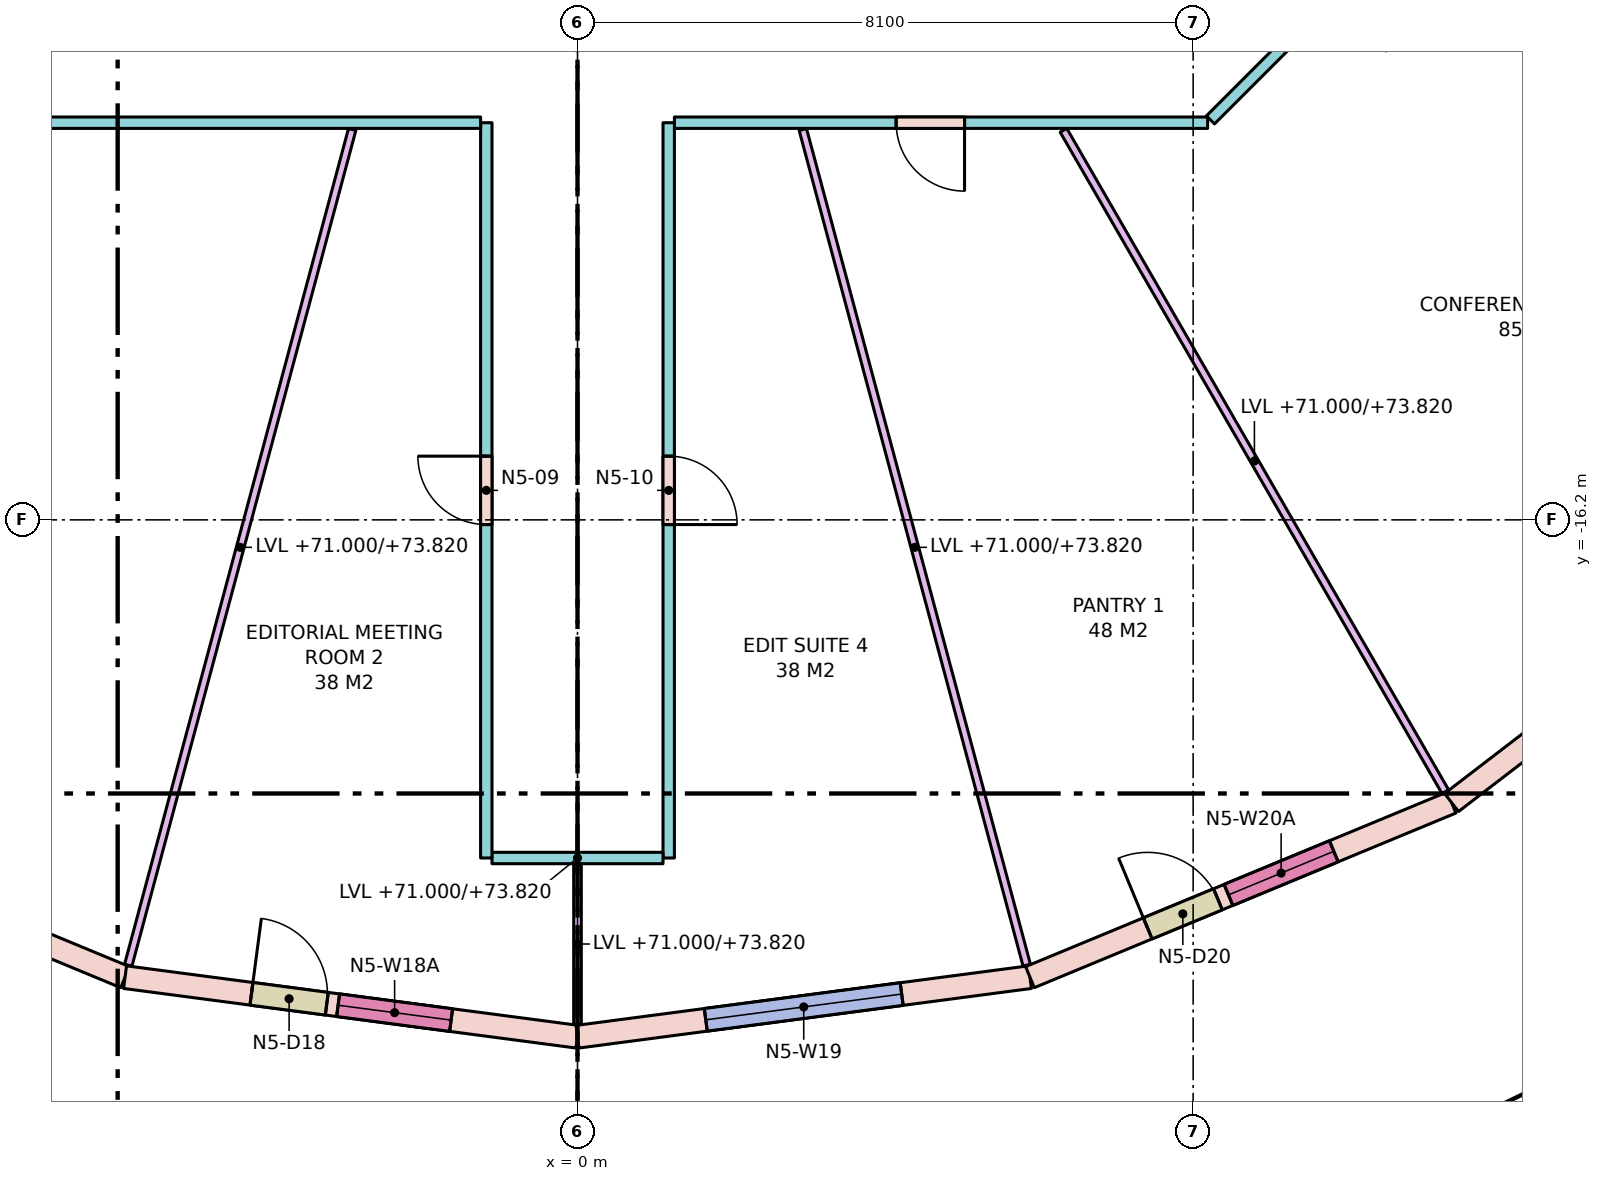
"""IFC4 building model, lengths in metres.
Left out: names, types, materials, properties, quantities, classifications, styles, units other than length and angle.
Written with IfcOpenShell. Run it as: python <this file> out.ifc"""

import sys

from ifc_helpers import new_model, si_unit, direction, frame, frame_2d, origin, place, context, subcontext, project, spatial, rectangle, extrude, element, fill, save


model = new_model("IFC4")
c1 = context("Model", 3, precision=1e-05, world=origin(), true_north=direction((0.0, 1.0)))
c2 = subcontext(c1, "Body", "Model", "MODEL_VIEW")
j1 = project(units=[si_unit("LENGTHUNIT", "METRE"), si_unit("PLANEANGLEUNIT", "RADIAN")], contexts=[c1])
p1 = place(None, origin())
s1 = spatial("IfcSite", under=j1, at=p1, CompositionType="ELEMENT")
p2 = place(p1, origin())
s2 = spatial("IfcBuilding", under=s1, at=p2, CompositionType="ELEMENT")
p3 = place(p2, frame((0.0, 0.0, 71.0)))
s3 = spatial("IfcBuildingStorey", under=s2, at=p3, CompositionType="ELEMENT", Elevation=71.0)
p4 = place(p3, frame((-11.5, -19.919, 0.0), z_axis=(0.0, 0.0, 1.0), x_axis=(0.923884511653, -0.382671411433, 0.0)))
e1 = element("IfcWall", 1, at=p4, inside=s3, PredefinedType="STANDARD", context=c2, shape_type="SweptSolid", body=[
    extrude(rectangle(XDim=6.004, YDim=0.3, at=frame_2d((3.002, 0.0))), origin(), (0.0, 0.0, 1.0), 3.72),
])
p5 = place(p4, frame((1.702, 0.0, 0.8)))
e2 = element("IfcOpeningElement", 2, at=p5, cuts=e1, PredefinedType="OPENING", context=c2, shape_type="SweptSolid", body=[
    extrude(rectangle(XDim=2.6, YDim=2.7, at=frame_2d((1.3, 1.35))), frame((0.0, 0.16, 0.0), z_axis=(0.0, -1.0, 0.0), x_axis=(1.0, 0.0, 0.0)), (0.0, 0.0, 1.0), 0.32),
])
p6 = place(p3, frame((-5.953, -22.216, 0.0), z_axis=(0.0, 0.0, 1.0), x_axis=(0.991445297315, -0.130522880875, 0.0)))
e3 = element("IfcWall", 3, at=p6, inside=s3, PredefinedType="STANDARD", context=c2, shape_type="SweptSolid", body=[
    extrude(rectangle(XDim=6.004, YDim=0.3, at=frame_2d((3.002, 0.0))), origin(), (0.0, 0.0, 1.0), 3.72),
])
p7 = place(p6, frame((1.677, 0.0, 0.0)))
e4 = element("IfcOpeningElement", 4, at=p7, cuts=e3, PredefinedType="OPENING", context=c2, shape_type="SweptSolid", body=[
    extrude(rectangle(XDim=1.0, YDim=2.4, at=frame_2d((0.5, 1.2))), frame((0.0, 0.16, 0.0), z_axis=(0.0, -1.0, 0.0), x_axis=(1.0, 0.0, 0.0)), (0.0, 0.0, 1.0), 0.32),
])
p8 = place(p6, frame((2.827, 0.0, 0.8)))
e5 = element("IfcOpeningElement", 5, at=p8, cuts=e3, PredefinedType="OPENING", context=c2, shape_type="SweptSolid", body=[
    extrude(rectangle(XDim=1.5, YDim=2.7, at=frame_2d((0.75, 1.35))), frame((0.0, 0.16, 0.0), z_axis=(0.0, -1.0, 0.0), x_axis=(1.0, 0.0, 0.0)), (0.0, 0.0, 1.0), 0.32),
])
p9 = place(p3, frame((0.0, -23.0, 0.0), z_axis=(0.0, 0.0, 1.0), x_axis=(0.991445297315, 0.130522880875, 0.0)))
e6 = element("IfcWall", 6, at=p9, inside=s3, PredefinedType="STANDARD", context=c2, shape_type="SweptSolid", body=[
    extrude(rectangle(XDim=6.004, YDim=0.3, at=frame_2d((3.002, 0.0))), origin(), (0.0, 0.0, 1.0), 3.72),
])
p10 = place(p9, frame((1.702, 0.0, 0.8)))
e7 = element("IfcOpeningElement", 7, at=p10, cuts=e6, PredefinedType="OPENING", context=c2, shape_type="SweptSolid", body=[
    extrude(rectangle(XDim=2.6, YDim=2.7, at=frame_2d((1.3, 1.35))), frame((0.0, 0.16, 0.0), z_axis=(0.0, -1.0, 0.0), x_axis=(1.0, 0.0, 0.0)), (0.0, 0.0, 1.0), 0.32),
])
p11 = place(p3, frame((5.953, -22.216, 0.0), z_axis=(0.0, 0.0, 1.0), x_axis=(0.923884511653, 0.382671411433, 0.0)))
e8 = element("IfcWall", 8, at=p11, inside=s3, PredefinedType="STANDARD", context=c2, shape_type="SweptSolid", body=[
    extrude(rectangle(XDim=6.004, YDim=0.3, at=frame_2d((3.002, 0.0))), origin(), (0.0, 0.0, 1.0), 3.72),
])
p12 = place(p11, frame((1.677, 0.0, 0.0)))
e9 = element("IfcOpeningElement", 9, at=p12, cuts=e8, PredefinedType="OPENING", context=c2, shape_type="SweptSolid", body=[
    extrude(rectangle(XDim=1.0, YDim=2.4, at=frame_2d((0.5, 1.2))), frame((0.0, 0.16, 0.0), z_axis=(0.0, -1.0, 0.0), x_axis=(1.0, 0.0, 0.0)), (0.0, 0.0, 1.0), 0.32),
])
p13 = place(p11, frame((2.827, 0.0, 0.8)))
e10 = element("IfcOpeningElement", 10, at=p13, cuts=e8, PredefinedType="OPENING", context=c2, shape_type="SweptSolid", body=[
    extrude(rectangle(XDim=1.5, YDim=2.7, at=frame_2d((0.75, 1.35))), frame((0.0, 0.16, 0.0), z_axis=(0.0, -1.0, 0.0), x_axis=(1.0, 0.0, 0.0)), (0.0, 0.0, 1.0), 0.32),
])
p14 = place(p3, frame((11.5, -19.919, 0.0), z_axis=(0.0, 0.0, 1.0), x_axis=(0.793339924758, 0.608778912074, 0.0)))
e11 = element("IfcWall", 11, at=p14, inside=s3, PredefinedType="STANDARD", context=c2, shape_type="SweptSolid", body=[
    extrude(rectangle(XDim=6.004, YDim=0.3, at=frame_2d((3.002, 0.0))), origin(), (0.0, 0.0, 1.0), 3.72),
])
p15 = place(p14, frame((1.702, 0.0, 0.8)))
e12 = element("IfcOpeningElement", 12, at=p15, cuts=e11, PredefinedType="OPENING", context=c2, shape_type="SweptSolid", body=[
    extrude(rectangle(XDim=2.6, YDim=2.7, at=frame_2d((1.3, 1.35))), frame((0.0, 0.16, 0.0), z_axis=(0.0, -1.0, 0.0), x_axis=(1.0, 0.0, 0.0)), (0.0, 0.0, 1.0), 0.32),
])
p16 = place(p3, frame((12.975, -6.291, 0.0), z_axis=(0.0, 0.0, 1.0), x_axis=(-0.707125355289, -0.707088206597, 0.0)))
e13 = element("IfcWall", 13, at=p16, inside=s3, PredefinedType="PARTITIONING", context=c2, shape_type="SweptSolid", body=[
    extrude(rectangle(XDim=6.572, YDim=0.15, at=frame_2d((3.286, 0.0))), origin(), (0.0, 0.0, 1.0), 2.82),
])
p17 = place(p16, frame((3.298, 0.0, 0.0)))
e14 = element("IfcOpeningElement", 14, at=p17, cuts=e13, PredefinedType="OPENING", context=c2, shape_type="SweptSolid", body=[
    extrude(rectangle(XDim=1.0, YDim=2.1, at=frame_2d((0.5, 1.05))), frame((0.0, 0.085, 0.0), z_axis=(0.0, -1.0, 0.0), x_axis=(1.0, 0.0, 0.0)), (0.0, 0.0, 1.0), 0.17),
])
p18 = place(p3, frame((8.291, -10.975, 0.0), z_axis=(0.0, 0.0, 1.0), x_axis=(-1.0, 0.0, 0.0)))
e15 = element("IfcWall", 15, at=p18, inside=s3, PredefinedType="PARTITIONING", context=c2, shape_type="SweptSolid", body=[
    extrude(rectangle(XDim=7.016, YDim=0.15, at=frame_2d((3.508, 0.0))), origin(), (0.0, 0.0, 1.0), 2.82),
])
p19 = place(p18, frame((3.198, 0.0, 0.0)))
e16 = element("IfcOpeningElement", 16, at=p19, cuts=e15, PredefinedType="OPENING", context=c2, shape_type="SweptSolid", body=[
    extrude(rectangle(XDim=0.9, YDim=2.1, at=frame_2d((0.45, 1.05))), frame((0.0, 0.085, 0.0), z_axis=(0.0, -1.0, 0.0), x_axis=(1.0, 0.0, 0.0)), (0.0, 0.0, 1.0), 0.17),
])
p20 = place(p3, frame((1.2, -10.975, 0.0), z_axis=(0.0, 0.0, 1.0), x_axis=(0.0, -1.0, 0.0)))
e17 = element("IfcWall", 17, at=p20, inside=s3, PredefinedType="PARTITIONING", context=c2, shape_type="SweptSolid", body=[
    extrude(rectangle(XDim=9.674, YDim=0.15, at=frame_2d((4.837, 0.0))), origin(), (0.0, 0.0, 1.0), 3.72),
])
p21 = place(p20, frame((4.387, 0.0, 0.0)))
e18 = element("IfcOpeningElement", 18, at=p21, cuts=e17, PredefinedType="OPENING", context=c2, shape_type="SweptSolid", body=[
    extrude(rectangle(XDim=0.9, YDim=2.1, at=frame_2d((0.45, 1.05))), frame((0.0, 0.085, 0.0), z_axis=(0.0, -1.0, 0.0), x_axis=(1.0, 0.0, 0.0)), (0.0, 0.0, 1.0), 0.17),
])
p22 = place(p3, frame((1.125, -20.649, 0.0), z_axis=(0.0, 0.0, 1.0), x_axis=(-1.0, 0.0, 0.0)))
e19 = element("IfcWall", 19, at=p22, inside=s3, PredefinedType="PARTITIONING", context=c2, shape_type="SweptSolid", body=[
    extrude(rectangle(XDim=2.25, YDim=0.15, at=frame_2d((1.125, 0.0))), origin(), (0.0, 0.0, 1.0), 2.82),
])
p23 = place(p3, frame((-1.2, -20.649, 0.0), z_axis=(0.0, 0.0, 1.0), x_axis=(0.0, 1.0, 0.0)))
e20 = element("IfcWall", 20, at=p23, inside=s3, PredefinedType="PARTITIONING", context=c2, shape_type="SweptSolid", body=[
    extrude(rectangle(XDim=9.674, YDim=0.15, at=frame_2d((4.837, 0.0))), origin(), (0.0, 0.0, 1.0), 3.72),
])
p24 = place(p23, frame((4.387, 0.0, 0.0)))
e21 = element("IfcOpeningElement", 21, at=p24, cuts=e20, PredefinedType="OPENING", context=c2, shape_type="SweptSolid", body=[
    extrude(rectangle(XDim=0.9, YDim=2.1, at=frame_2d((0.45, 1.05))), frame((0.0, 0.085, 0.0), z_axis=(0.0, -1.0, 0.0), x_axis=(1.0, 0.0, 0.0)), (0.0, 0.0, 1.0), 0.17),
])
p25 = place(p3, frame((-1.275, -10.975, 0.0), z_axis=(0.0, 0.0, 1.0), x_axis=(-1.0, 0.0, 0.0)))
e22 = element("IfcWall", 22, at=p25, inside=s3, PredefinedType="PARTITIONING", context=c2, shape_type="SweptSolid", body=[
    extrude(rectangle(XDim=7.016, YDim=0.15, at=frame_2d((3.508, 0.0))), origin(), (0.0, 0.0, 1.0), 2.82),
])
p26 = place(p3, frame((-2.965, -11.064, 0.0), z_axis=(0.0, 0.0, 1.0), x_axis=(-0.258827930947, -0.965923445291, 0.0)))
e23 = element("IfcWall", 23, at=p26, inside=s3, PredefinedType="PARTITIONING", context=c2, shape_type="SweptSolid", body=[
    extrude(rectangle(XDim=11.382, YDim=0.1, at=frame_2d((5.691, 0.0))), origin(), (0.0, 0.0, 1.0), 2.82),
])
p27 = place(p3, frame((0.0, -20.724, 0.0), z_axis=(0.0, 0.0, 1.0), x_axis=(0.0, -1.0, 0.0)))
e24 = element("IfcWall", 24, at=p27, inside=s3, PredefinedType="PARTITIONING", context=c2, shape_type="SweptSolid", body=[
    extrude(rectangle(XDim=2.113, YDim=0.1, at=frame_2d((1.057, 0.0))), origin(), (0.0, 0.0, 1.0), 2.82),
])
p28 = place(p3, frame((2.965, -11.064, 0.0), z_axis=(0.0, 0.0, 1.0), x_axis=(0.258827930947, -0.965923445291, 0.0)))
e25 = element("IfcWall", 25, at=p28, inside=s3, PredefinedType="PARTITIONING", context=c2, shape_type="SweptSolid", body=[
    extrude(rectangle(XDim=11.382, YDim=0.1, at=frame_2d((5.691, 0.0))), origin(), (0.0, 0.0, 1.0), 2.82),
])
p29 = place(p3, frame((6.394, -11.075, 0.0), z_axis=(0.0, 0.0, 1.0), x_axis=(0.500024592647, -0.866011204747, 0.0)))
e26 = element("IfcWall", 26, at=p29, inside=s3, PredefinedType="PARTITIONING", context=c2, shape_type="SweptSolid", body=[
    extrude(rectangle(XDim=10.049, YDim=0.1, at=frame_2d((5.024, 0.0))), origin(), (0.0, 0.0, 1.0), 2.82),
])
p30 = place(p3, frame((12.294, -7.098, 0.0), z_axis=(0.0, 0.0, 1.0), x_axis=(0.866010547425, -0.500025731086, 0.0)))
e27 = element("IfcWall", 27, at=p30, inside=s3, PredefinedType="PARTITIONING", context=c2, shape_type="SweptSolid", body=[
    extrude(rectangle(XDim=8.641, YDim=0.1, at=frame_2d((4.32, 0.0))), origin(), (0.0, 0.0, 1.0), 2.82),
])
p31 = place(p7, origin())
e28 = element("IfcDoor", 28, at=p31, inside=s3, OperationType="SINGLE_SWING_LEFT", PredefinedType="DOOR", context=c2, shape_type="SweptSolid", body=[
    extrude(rectangle(XDim=1.0, YDim=2.4, at=frame_2d((0.5, 1.2))), frame((0.0, 0.025, 0.0), z_axis=(0.0, -1.0, 0.0), x_axis=(1.0, 0.0, 0.0)), (0.0, 0.0, 1.0), 0.05),
])
fill(e4, e28)
p32 = place(p8, origin())
e29 = element("IfcWindow", 29, at=p32, inside=s3, PartitioningType="SINGLE_PANEL", PredefinedType="WINDOW", context=c2, shape_type="SweptSolid", body=[
    extrude(rectangle(XDim=1.5, YDim=2.7, at=frame_2d((0.75, 1.35))), frame((0.0, 0.03, 0.0), z_axis=(0.0, -1.0, 0.0), x_axis=(1.0, 0.0, 0.0)), (0.0, 0.0, 1.0), 0.06),
])
fill(e5, e29)
p33 = place(p10, origin())
e30 = element("IfcWindow", 30, at=p33, inside=s3, PartitioningType="SINGLE_PANEL", PredefinedType="WINDOW", context=c2, shape_type="SweptSolid", body=[
    extrude(rectangle(XDim=2.6, YDim=2.7, at=frame_2d((1.3, 1.35))), frame((0.0, 0.03, 0.0), z_axis=(0.0, -1.0, 0.0), x_axis=(1.0, 0.0, 0.0)), (0.0, 0.0, 1.0), 0.06),
])
fill(e7, e30)
p34 = place(p12, origin())
e31 = element("IfcDoor", 31, at=p34, inside=s3, OperationType="SINGLE_SWING_LEFT", PredefinedType="DOOR", context=c2, shape_type="SweptSolid", body=[
    extrude(rectangle(XDim=1.0, YDim=2.4, at=frame_2d((0.5, 1.2))), frame((0.0, 0.025, 0.0), z_axis=(0.0, -1.0, 0.0), x_axis=(1.0, 0.0, 0.0)), (0.0, 0.0, 1.0), 0.05),
])
fill(e9, e31)
p35 = place(p13, origin())
e32 = element("IfcWindow", 32, at=p35, inside=s3, PartitioningType="SINGLE_PANEL", PredefinedType="WINDOW", context=c2, shape_type="SweptSolid", body=[
    extrude(rectangle(XDim=1.5, YDim=2.7, at=frame_2d((0.75, 1.35))), frame((0.0, 0.03, 0.0), z_axis=(0.0, -1.0, 0.0), x_axis=(1.0, 0.0, 0.0)), (0.0, 0.0, 1.0), 0.06),
])
fill(e10, e32)
p36 = place(p24, origin())
e33 = element("IfcDoor", 33, at=p36, inside=s3, OperationType="SINGLE_SWING_RIGHT", PredefinedType="DOOR", context=c2, shape_type="SweptSolid", body=[
    extrude(rectangle(XDim=0.9, YDim=2.1, at=frame_2d((0.45, 1.05))), frame((0.0, 0.025, 0.0), z_axis=(0.0, -1.0, 0.0), x_axis=(1.0, 0.0, 0.0)), (0.0, 0.0, 1.0), 0.05),
])
fill(e21, e33)
p37 = place(p21, origin())
e34 = element("IfcDoor", 34, at=p37, inside=s3, OperationType="SINGLE_SWING_RIGHT", PredefinedType="DOOR", context=c2, shape_type="SweptSolid", body=[
    extrude(rectangle(XDim=0.9, YDim=2.1, at=frame_2d((0.45, 1.05))), frame((0.0, 0.025, 0.0), z_axis=(0.0, -1.0, 0.0), x_axis=(1.0, 0.0, 0.0)), (0.0, 0.0, 1.0), 0.05),
])
fill(e18, e34)
p38 = place(p19, origin())
e35 = element("IfcDoor", 35, at=p38, inside=s3, OperationType="SINGLE_SWING_LEFT", PredefinedType="DOOR", context=c2, shape_type="SweptSolid", body=[
    extrude(rectangle(XDim=0.9, YDim=2.1, at=frame_2d((0.45, 1.05))), frame((0.0, 0.025, 0.0), z_axis=(0.0, -1.0, 0.0), x_axis=(1.0, 0.0, 0.0)), (0.0, 0.0, 1.0), 0.05),
])
fill(e16, e35)
save(model, sys.argv[1])
